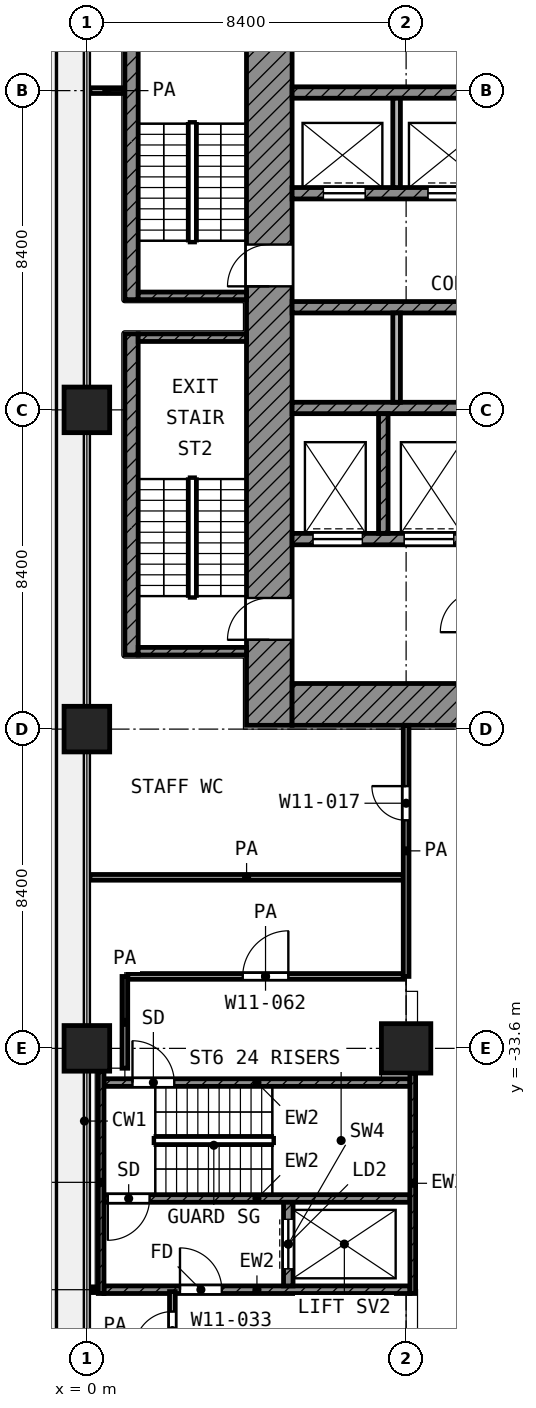
"""IFC4 building model, lengths in metres.
Left out: names, types, materials, properties, quantities, classifications, styles, units other than length and angle.
Written with IfcOpenShell. Run it as: python <this file> out.ifc"""

import sys

from ifc_helpers import new_model, si_unit, direction, frame, frame_2d, origin, origin_2d, place, context, subcontext, project, spatial, rectangle, extrude, element, fill, save


model = new_model("IFC4")
c1 = context("Model", 3, precision=1e-05, world=origin(), true_north=direction((0.0, 1.0)))
c2 = subcontext(c1, "Body", "Model", "MODEL_VIEW")
j1 = project(units=[si_unit("LENGTHUNIT", "METRE"), si_unit("PLANEANGLEUNIT", "RADIAN")], contexts=[c1])
p1 = place(None, origin())
s1 = spatial("IfcSite", under=j1, at=p1, CompositionType="ELEMENT")
p2 = place(p1, origin())
s2 = spatial("IfcBuilding", under=s1, at=p2, CompositionType="ELEMENT")
p3 = place(p2, frame((0.0, 0.0, 51.8)))
s3 = spatial("IfcBuildingStorey", under=s2, at=p3, CompositionType="ELEMENT", Elevation=51.8)
for number, where, z_axis, x_axis in (
    (1, (0.0, -16.8, 0.0), (0.0, 0.0, 1.0), (1.0, 0.0, 0.0)),
    (2, (0.0, -25.2, 0.0), (0.0, 0.0, 1.0), (1.0, 0.0, 0.0)),
    (3, (0.0, -33.6, 0.0), (0.0, 0.0, 1.0), (1.0, 0.0, 0.0)),
):
    element("IfcColumn", number, at=place(p3, frame(where, z_axis=z_axis, x_axis=x_axis)), inside=s3, PredefinedType="COLUMN", context=c2, shape_type="SweptSolid", body=[
        extrude(rectangle(XDim=1.2, YDim=1.2, at=origin_2d()), origin(), (0.0, 0.0, 1.0), 4.2),
    ])
p4 = place(p3, frame((8.4, -33.6, 0.0), z_axis=(0.0, 0.0, 1.0), x_axis=(1.0, 0.0, 0.0)))
e4 = element("IfcColumn", 4, at=p4, inside=s3, PredefinedType="COLUMN", context=c2, shape_type="SweptSolid", body=[
    extrude(rectangle(XDim=1.3, YDim=1.3, at=origin_2d()), origin(), (0.0, 0.0, 1.0), 4.2),
])
p5 = place(p3, frame((4.8, -25.1, 0.0), z_axis=(0.0, 0.0, 1.0), x_axis=(0.0, 1.0, 0.0)))
e5 = element("IfcWall", 5, at=p5, inside=s3, PredefinedType="SHEAR", context=c2, shape_type="SweptSolid", body=[
    extrude(rectangle(XDim=19.7, YDim=1.2, at=frame_2d((9.85, 0.0))), origin(), (0.0, 0.0, 1.0), 3.9),
])
p6 = place(p5, frame((11.55, 0.0, 0.0)))
e6 = element("IfcOpeningElement", 6, at=p6, cuts=e5, PredefinedType="OPENING", context=c2, shape_type="SweptSolid", body=[
    extrude(rectangle(XDim=1.1, YDim=2.1, at=frame_2d((0.55, 1.05))), frame((0.0, 0.61, 0.0), z_axis=(0.0, -1.0, 0.0), x_axis=(1.0, 0.0, 0.0)), (0.0, 0.0, 1.0), 1.22),
])
p7 = place(p5, frame((2.25, 0.0, 0.0)))
e7 = element("IfcOpeningElement", 7, at=p7, cuts=e5, PredefinedType="OPENING", context=c2, shape_type="SweptSolid", body=[
    extrude(rectangle(XDim=1.1, YDim=2.1, at=frame_2d((0.55, 1.05))), frame((0.0, 0.61, 0.0), z_axis=(0.0, -1.0, 0.0), x_axis=(1.0, 0.0, 0.0)), (0.0, 0.0, 1.0), 1.22),
])
p8 = place(p3, frame((5.4, -24.55, 0.0), z_axis=(0.0, 0.0, 1.0), x_axis=(1.0, 0.0, 0.0)))
e8 = element("IfcWall", 8, at=p8, inside=s3, PredefinedType="SHEAR", context=c2, shape_type="SweptSolid", body=[
    extrude(rectangle(XDim=18.6, YDim=1.1, at=frame_2d((9.3, 0.0))), origin(), (0.0, 0.0, 1.0), 3.9),
])
p9 = place(p8, frame((6.3, 0.0, 0.0)))
e9 = element("IfcOpeningElement", 9, at=p9, cuts=e8, PredefinedType="OPENING", context=c2, shape_type="SweptSolid", body=[
    extrude(rectangle(XDim=1.8, YDim=2.1, at=frame_2d((0.9, 1.05))), frame((0.0, 0.56, 0.0), z_axis=(0.0, -1.0, 0.0), x_axis=(1.0, 0.0, 0.0)), (0.0, 0.0, 1.0), 1.12),
])
p10 = place(p3, frame((5.4, -8.45, 0.0), z_axis=(0.0, 0.0, 1.0), x_axis=(1.0, 0.0, 0.0)))
e10 = element("IfcWall", 10, at=p10, inside=s3, PredefinedType="SHEAR", context=c2, shape_type="SweptSolid", body=[
    extrude(rectangle(XDim=16.65, YDim=0.3, at=frame_2d((8.325, 0.0))), origin(), (0.0, 0.0, 1.0), 3.9),
])
p11 = place(p3, frame((5.4, -11.1, 0.0), z_axis=(0.0, 0.0, 1.0), x_axis=(1.0, 0.0, 0.0)))
e11 = element("IfcWall", 11, at=p11, inside=s3, PredefinedType="SHEAR", context=c2, shape_type="SweptSolid", body=[
    extrude(rectangle(XDim=16.65, YDim=0.3, at=frame_2d((8.325, 0.0))), origin(), (0.0, 0.0, 1.0), 3.9),
])
p12 = place(p11, frame((0.825, 0.0, 0.0)))
e12 = element("IfcOpeningElement", 12, at=p12, cuts=e11, PredefinedType="OPENING", context=c2, shape_type="SweptSolid", body=[
    extrude(rectangle(XDim=1.1, YDim=2.1, at=frame_2d((0.55, 1.05))), frame((0.0, 0.16, 0.0), z_axis=(0.0, -1.0, 0.0), x_axis=(1.0, 0.0, 0.0)), (0.0, 0.0, 1.0), 0.32),
])
p13 = place(p11, frame((3.575, 0.0, 0.0)))
e13 = element("IfcOpeningElement", 13, at=p13, cuts=e11, PredefinedType="OPENING", context=c2, shape_type="SweptSolid", body=[
    extrude(rectangle(XDim=1.1, YDim=2.1, at=frame_2d((0.55, 1.05))), frame((0.0, 0.16, 0.0), z_axis=(0.0, -1.0, 0.0), x_axis=(1.0, 0.0, 0.0)), (0.0, 0.0, 1.0), 0.32),
])
p14 = place(p11, frame((6.325, 0.0, 0.0)))
e14 = element("IfcOpeningElement", 14, at=p14, cuts=e11, PredefinedType="OPENING", context=c2, shape_type="SweptSolid", body=[
    extrude(rectangle(XDim=1.1, YDim=2.1, at=frame_2d((0.55, 1.05))), frame((0.0, 0.16, 0.0), z_axis=(0.0, -1.0, 0.0), x_axis=(1.0, 0.0, 0.0)), (0.0, 0.0, 1.0), 0.32),
])
p15 = place(p11, frame((9.075, 0.0, 0.0)))
e15 = element("IfcOpeningElement", 15, at=p15, cuts=e11, PredefinedType="OPENING", context=c2, shape_type="SweptSolid", body=[
    extrude(rectangle(XDim=1.1, YDim=2.1, at=frame_2d((0.55, 1.05))), frame((0.0, 0.16, 0.0), z_axis=(0.0, -1.0, 0.0), x_axis=(1.0, 0.0, 0.0)), (0.0, 0.0, 1.0), 0.32),
])
for number, where, z_axis, x_axis in (
    (16, (5.4, -14.1, 0.0), (0.0, 0.0, 1.0), (1.0, 0.0, 0.0)),
    (17, (5.4, -16.75, 0.0), (0.0, 0.0, 1.0), (1.0, 0.0, 0.0)),
):
    element("IfcWall", number, at=place(p3, frame(where, z_axis=z_axis, x_axis=x_axis)), inside=s3, PredefinedType="SHEAR", context=c2, shape_type="SweptSolid", body=[
        extrude(rectangle(XDim=16.65, YDim=0.3, at=frame_2d((8.325, 0.0))), origin(), (0.0, 0.0, 1.0), 3.9),
    ])
p16 = place(p3, frame((5.4, -20.2, 0.0), z_axis=(0.0, 0.0, 1.0), x_axis=(1.0, 0.0, 0.0)))
e18 = element("IfcWall", 18, at=p16, inside=s3, PredefinedType="SHEAR", context=c2, shape_type="SweptSolid", body=[
    extrude(rectangle(XDim=14.65, YDim=0.3, at=frame_2d((7.325, 0.0))), origin(), (0.0, 0.0, 1.0), 3.9),
])
p17 = place(p16, frame((10.55, 0.0, 0.0)))
e19 = element("IfcOpeningElement", 19, at=p17, cuts=e18, PredefinedType="OPENING", context=c2, shape_type="SweptSolid", body=[
    extrude(rectangle(XDim=1.3, YDim=2.1, at=frame_2d((0.65, 1.05))), frame((0.0, 0.16, 0.0), z_axis=(0.0, -1.0, 0.0), x_axis=(1.0, 0.0, 0.0)), (0.0, 0.0, 1.0), 0.32),
])
p18 = place(p16, frame((12.95, 0.0, 0.0)))
e20 = element("IfcOpeningElement", 20, at=p18, cuts=e18, PredefinedType="OPENING", context=c2, shape_type="SweptSolid", body=[
    extrude(rectangle(XDim=1.3, YDim=2.1, at=frame_2d((0.65, 1.05))), frame((0.0, 0.16, 0.0), z_axis=(0.0, -1.0, 0.0), x_axis=(1.0, 0.0, 0.0)), (0.0, 0.0, 1.0), 0.32),
])
p19 = place(p16, frame((0.55, 0.0, 0.0)))
e21 = element("IfcOpeningElement", 21, at=p19, cuts=e18, PredefinedType="OPENING", context=c2, shape_type="SweptSolid", body=[
    extrude(rectangle(XDim=1.3, YDim=2.1, at=frame_2d((0.65, 1.05))), frame((0.0, 0.16, 0.0), z_axis=(0.0, -1.0, 0.0), x_axis=(1.0, 0.0, 0.0)), (0.0, 0.0, 1.0), 0.32),
])
p20 = place(p16, frame((2.95, 0.0, 0.0)))
e22 = element("IfcOpeningElement", 22, at=p20, cuts=e18, PredefinedType="OPENING", context=c2, shape_type="SweptSolid", body=[
    extrude(rectangle(XDim=1.3, YDim=2.1, at=frame_2d((0.65, 1.05))), frame((0.0, 0.16, 0.0), z_axis=(0.0, -1.0, 0.0), x_axis=(1.0, 0.0, 0.0)), (0.0, 0.0, 1.0), 0.32),
])
p21 = place(p16, frame((6.55, 0.0, 0.0)))
e23 = element("IfcOpeningElement", 23, at=p21, cuts=e18, PredefinedType="OPENING", context=c2, shape_type="SweptSolid", body=[
    extrude(rectangle(XDim=0.9, YDim=2.1, at=frame_2d((0.45, 1.05))), frame((0.0, 0.16, 0.0), z_axis=(0.0, -1.0, 0.0), x_axis=(1.0, 0.0, 0.0)), (0.0, 0.0, 1.0), 0.32),
])
p22 = place(p16, frame((8.95, 0.0, 0.0)))
e24 = element("IfcOpeningElement", 24, at=p22, cuts=e18, PredefinedType="OPENING", context=c2, shape_type="SweptSolid", body=[
    extrude(rectangle(XDim=0.9, YDim=2.1, at=frame_2d((0.45, 1.05))), frame((0.0, 0.16, 0.0), z_axis=(0.0, -1.0, 0.0), x_axis=(1.0, 0.0, 0.0)), (0.0, 0.0, 1.0), 0.32),
])
p23 = place(p3, frame((7.8, -20.05, 0.0), z_axis=(0.0, 0.0, 1.0), x_axis=(0.0, 1.0, 0.0)))
e25 = element("IfcWall", 25, at=p23, inside=s3, PredefinedType="SHEAR", context=c2, shape_type="SweptSolid", body=[
    extrude(rectangle(XDim=3.15, YDim=0.25, at=frame_2d((1.575, 0.0))), origin(), (0.0, 0.0, 1.0), 3.9),
])
p24 = place(p3, frame((8.15, -10.95, 0.0), z_axis=(0.0, 0.0, 1.0), x_axis=(0.0, 1.0, 0.0)))
e26 = element("IfcWall", 26, at=p24, inside=s3, PredefinedType="PARTITIONING", context=c2, shape_type="SweptSolid", body=[
    extrude(rectangle(XDim=2.35, YDim=0.2, at=frame_2d((1.175, 0.0))), origin(), (0.0, 0.0, 1.0), 3.9),
])
p25 = place(p3, frame((8.15, -16.6, 0.0), z_axis=(0.0, 0.0, 1.0), x_axis=(0.0, 1.0, 0.0)))
e27 = element("IfcWall", 27, at=p25, inside=s3, PredefinedType="PARTITIONING", context=c2, shape_type="SweptSolid", body=[
    extrude(rectangle(XDim=2.35, YDim=0.2, at=frame_2d((1.175, 0.0))), origin(), (0.0, 0.0, 1.0), 3.9),
])
p26 = place(p3, frame((1.175, -13.9, 0.0), z_axis=(0.0, 0.0, 1.0), x_axis=(0.0, 1.0, 0.0)))
e28 = element("IfcWall", 28, at=p26, inside=s3, PredefinedType="SHEAR", context=c2, shape_type="SweptSolid", body=[
    extrude(rectangle(XDim=8.45, YDim=0.35, at=frame_2d((4.225, 0.0))), origin(), (0.0, 0.0, 1.0), 3.9),
])
p27 = place(p3, frame((1.35, -13.8, 0.0), z_axis=(0.0, 0.0, 1.0), x_axis=(1.0, 0.0, 0.0)))
e29 = element("IfcWall", 29, at=p27, inside=s3, PredefinedType="SHEAR", context=c2, shape_type="SweptSolid", body=[
    extrude(rectangle(XDim=2.85, YDim=0.2, at=frame_2d((1.425, 0.0))), origin(), (0.0, 0.0, 1.0), 3.9),
])
p28 = place(p3, frame((1.175, -23.25, 0.0), z_axis=(0.0, 0.0, 1.0), x_axis=(0.0, 1.0, 0.0)))
e30 = element("IfcWall", 30, at=p28, inside=s3, PredefinedType="SHEAR", context=c2, shape_type="SweptSolid", body=[
    extrude(rectangle(XDim=8.45, YDim=0.35, at=frame_2d((4.225, 0.0))), origin(), (0.0, 0.0, 1.0), 3.9),
])
for number, where, z_axis, x_axis in (
    (31, (1.35, -14.9, 0.0), (0.0, 0.0, 1.0), (1.0, 0.0, 0.0)),
    (32, (1.35, -23.15, 0.0), (0.0, 0.0, 1.0), (1.0, 0.0, 0.0)),
):
    element("IfcWall", number, at=place(p3, frame(where, z_axis=z_axis, x_axis=x_axis)), inside=s3, PredefinedType="SHEAR", context=c2, shape_type="SweptSolid", body=[
        extrude(rectangle(XDim=2.85, YDim=0.2, at=frame_2d((1.425, 0.0))), origin(), (0.0, 0.0, 1.0), 3.9),
    ])
p29 = place(p3, frame((0.375, -40.05, 0.0), z_axis=(0.0, 0.0, 1.0), x_axis=(0.0, 1.0, 0.0)))
e33 = element("IfcWall", 33, at=p29, inside=s3, PredefinedType="SHEAR", context=c2, shape_type="SweptSolid", body=[
    extrude(rectangle(XDim=5.85, YDim=0.15, at=frame_2d((2.925, 0.0))), origin(), (0.0, 0.0, 1.0), 3.9),
])
p30 = place(p3, frame((8.575, -40.05, 0.0), z_axis=(0.0, 0.0, 1.0), x_axis=(0.0, 1.0, 0.0)))
e34 = element("IfcWall", 34, at=p30, inside=s3, PredefinedType="SHEAR", context=c2, shape_type="SweptSolid", body=[
    extrude(rectangle(XDim=5.8, YDim=0.15, at=frame_2d((2.9, 0.0))), origin(), (0.0, 0.0, 1.0), 3.9),
])
p31 = place(p3, frame((0.45, -34.5, 0.0), z_axis=(0.0, 0.0, 1.0), x_axis=(1.0, 0.0, 0.0)))
e35 = element("IfcWall", 35, at=p31, inside=s3, PredefinedType="SHEAR", context=c2, shape_type="SweptSolid", body=[
    extrude(rectangle(XDim=8.05, YDim=0.2, at=frame_2d((4.025, 0.0))), origin(), (0.0, 0.0, 1.0), 3.9),
])
p32 = place(p31, frame((0.75, 0.0, 0.0)))
e36 = element("IfcOpeningElement", 36, at=p32, cuts=e35, PredefinedType="OPENING", context=c2, shape_type="SweptSolid", body=[
    extrude(rectangle(XDim=1.1, YDim=2.1, at=frame_2d((0.55, 1.05))), frame((0.0, 0.11, 0.0), z_axis=(0.0, -1.0, 0.0), x_axis=(1.0, 0.0, 0.0)), (0.0, 0.0, 1.0), 0.22),
])
p33 = place(p3, frame((0.45, -37.55, 0.0), z_axis=(0.0, 0.0, 1.0), x_axis=(1.0, 0.0, 0.0)))
e37 = element("IfcWall", 37, at=p33, inside=s3, PredefinedType="SHEAR", context=c2, shape_type="SweptSolid", body=[
    extrude(rectangle(XDim=8.05, YDim=0.2, at=frame_2d((4.025, 0.0))), origin(), (0.0, 0.0, 1.0), 3.9),
])
p34 = place(p33, frame((0.1, 0.0, 0.0)))
e38 = element("IfcOpeningElement", 38, at=p34, cuts=e37, PredefinedType="OPENING", context=c2, shape_type="SweptSolid", body=[
    extrude(rectangle(XDim=1.1, YDim=2.1, at=frame_2d((0.55, 1.05))), frame((0.0, 0.11, 0.0), z_axis=(0.0, -1.0, 0.0), x_axis=(1.0, 0.0, 0.0)), (0.0, 0.0, 1.0), 0.22),
])
p35 = place(p3, frame((0.45, -39.95, 0.0), z_axis=(0.0, 0.0, 1.0), x_axis=(1.0, 0.0, 0.0)))
e39 = element("IfcWall", 39, at=p35, inside=s3, PredefinedType="SHEAR", context=c2, shape_type="SweptSolid", body=[
    extrude(rectangle(XDim=8.05, YDim=0.2, at=frame_2d((4.025, 0.0))), origin(), (0.0, 0.0, 1.0), 3.9),
])
p36 = place(p35, frame((2.0, 0.0, 0.0)))
e40 = element("IfcOpeningElement", 40, at=p36, cuts=e39, PredefinedType="OPENING", context=c2, shape_type="SweptSolid", body=[
    extrude(rectangle(XDim=1.1, YDim=2.1, at=frame_2d((0.55, 1.05))), frame((0.0, 0.11, 0.0), z_axis=(0.0, -1.0, 0.0), x_axis=(1.0, 0.0, 0.0)), (0.0, 0.0, 1.0), 0.22),
])
p37 = place(p3, frame((5.3, -39.85, 0.0), z_axis=(0.0, 0.0, 1.0), x_axis=(0.0, 1.0, 0.0)))
e41 = element("IfcWall", 41, at=p37, inside=s3, PredefinedType="SHEAR", context=c2, shape_type="SweptSolid", body=[
    extrude(rectangle(XDim=2.2, YDim=0.25, at=frame_2d((1.1, 0.0))), origin(), (0.0, 0.0, 1.0), 3.9),
])
p38 = place(p37, frame((0.45, 0.0, 0.0)))
e42 = element("IfcOpeningElement", 42, at=p38, cuts=e41, PredefinedType="OPENING", context=c2, shape_type="SweptSolid", body=[
    extrude(rectangle(XDim=1.3, YDim=2.1, at=frame_2d((0.65, 1.05))), frame((0.0, 0.135, 0.0), z_axis=(0.0, -1.0, 0.0), x_axis=(1.0, 0.0, 0.0)), (0.0, 0.0, 1.0), 0.27),
])
p39 = place(p3, frame((0.08, -39.95, 0.0), z_axis=(0.0, 0.0, 1.0), x_axis=(1.0, 0.0, 0.0)))
e43 = element("IfcWall", 43, at=p39, inside=s3, PredefinedType="PARTITIONING", context=c2, shape_type="SweptSolid", body=[
    extrude(rectangle(XDim=0.19, YDim=0.15, at=frame_2d((0.095, 0.0))), origin(), (0.0, 0.0, 1.0), 3.9),
])
p40 = place(p3, frame((1.077, -31.707, 0.0), z_axis=(0.0, 0.0, 1.0), x_axis=(1.0, 0.0, 0.0)))
e44 = element("IfcWall", 44, at=p40, inside=s3, PredefinedType="PARTITIONING", context=c2, shape_type="SweptSolid", body=[
    extrude(rectangle(XDim=7.248, YDim=0.15, at=frame_2d((3.624, 0.0))), origin(), (0.0, 0.0, 1.0), 3.9),
])
p41 = place(p40, frame((3.024, 0.0, 0.0)))
e45 = element("IfcOpeningElement", 45, at=p41, cuts=e44, PredefinedType="OPENING", context=c2, shape_type="SweptSolid", body=[
    extrude(rectangle(XDim=1.2, YDim=2.1, at=frame_2d((0.6, 1.05))), frame((0.0, 0.085, 0.0), z_axis=(0.0, -1.0, 0.0), x_axis=(1.0, 0.0, 0.0)), (0.0, 0.0, 1.0), 0.17),
])
p42 = place(p3, frame((0.08, -29.1, 0.0), z_axis=(0.0, 0.0, 1.0), x_axis=(1.0, 0.0, 0.0)))
e46 = element("IfcWall", 46, at=p42, inside=s3, PredefinedType="PARTITIONING", context=c2, shape_type="SweptSolid", body=[
    extrude(rectangle(XDim=8.245, YDim=0.15, at=frame_2d((4.123, 0.0))), origin(), (0.0, 0.0, 1.0), 3.9),
])
p43 = place(p3, frame((0.08, -8.4, 0.0), z_axis=(0.0, 0.0, 1.0), x_axis=(1.0, 0.0, 0.0)))
e47 = element("IfcWall", 47, at=p43, inside=s3, PredefinedType="PARTITIONING", context=c2, shape_type="SweptSolid", body=[
    extrude(rectangle(XDim=0.89, YDim=0.15, at=frame_2d((0.445, 0.0))), origin(), (0.0, 0.0, 1.0), 3.9),
])
p44 = place(p3, frame((1.0, -34.123, 0.0), z_axis=(0.0, 0.0, 1.0), x_axis=(0.0, 1.0, 0.0)))
e48 = element("IfcWall", 48, at=p44, inside=s3, PredefinedType="PARTITIONING", context=c2, shape_type="SweptSolid", body=[
    extrude(rectangle(XDim=2.415, YDim=0.15, at=frame_2d((1.208, 0.0))), origin(), (0.0, 0.0, 1.0), 3.9),
])
p45 = place(p3, frame((2.25, -42.348, 0.0), z_axis=(0.0, 0.0, 1.0), x_axis=(0.0, 1.0, 0.0)))
e49 = element("IfcWall", 49, at=p45, inside=s3, PredefinedType="PARTITIONING", context=c2, shape_type="SweptSolid", body=[
    extrude(rectangle(XDim=2.348, YDim=0.15, at=frame_2d((1.174, 0.0))), origin(), (0.0, 0.0, 1.0), 3.9),
])
p46 = place(p45, frame((0.823, 0.0, 0.0)))
e50 = element("IfcOpeningElement", 50, at=p46, cuts=e49, PredefinedType="OPENING", context=c2, shape_type="SweptSolid", body=[
    extrude(rectangle(XDim=1.0, YDim=2.1, at=frame_2d((0.5, 1.05))), frame((0.0, 0.085, 0.0), z_axis=(0.0, -1.0, 0.0), x_axis=(1.0, 0.0, 0.0)), (0.0, 0.0, 1.0), 0.17),
])
p47 = place(p3, frame((8.4, -31.707, 0.0), z_axis=(0.0, 0.0, 1.0), x_axis=(0.0, 1.0, 0.0)))
e51 = element("IfcWall", 51, at=p47, inside=s3, PredefinedType="PARTITIONING", context=c2, shape_type="SweptSolid", body=[
    extrude(rectangle(XDim=6.607, YDim=0.15, at=frame_2d((3.303, 0.0))), origin(), (0.0, 0.0, 1.0), 3.9),
])
p48 = place(p47, frame((4.107, 0.0, 0.0)))
e52 = element("IfcOpeningElement", 52, at=p48, cuts=e51, PredefinedType="OPENING", context=c2, shape_type="SweptSolid", body=[
    extrude(rectangle(XDim=0.9, YDim=2.1, at=frame_2d((0.45, 1.05))), frame((0.0, 0.085, 0.0), z_axis=(0.0, -1.0, 0.0), x_axis=(1.0, 0.0, 0.0)), (0.0, 0.0, 1.0), 0.17),
])
p49 = place(p12, origin())
e53 = element("IfcDoor", 53, at=p49, inside=s3, OperationType="DOUBLE_DOOR_SLIDING", PredefinedType="DOOR", context=c2, shape_type="SweptSolid", body=[
    extrude(rectangle(XDim=1.1, YDim=2.1, at=frame_2d((0.55, 1.05))), frame((0.0, 0.025, 0.0), z_axis=(0.0, -1.0, 0.0), x_axis=(1.0, 0.0, 0.0)), (0.0, 0.0, 1.0), 0.05),
])
fill(e12, e53)
p50 = place(p13, origin())
e54 = element("IfcDoor", 54, at=p50, inside=s3, OperationType="DOUBLE_DOOR_SLIDING", PredefinedType="DOOR", context=c2, shape_type="SweptSolid", body=[
    extrude(rectangle(XDim=1.1, YDim=2.1, at=frame_2d((0.55, 1.05))), frame((0.0, 0.025, 0.0), z_axis=(0.0, -1.0, 0.0), x_axis=(1.0, 0.0, 0.0)), (0.0, 0.0, 1.0), 0.05),
])
fill(e13, e54)
p51 = place(p19, origin())
e55 = element("IfcDoor", 55, at=p51, inside=s3, OperationType="DOUBLE_DOOR_SLIDING", PredefinedType="DOOR", context=c2, shape_type="SweptSolid", body=[
    extrude(rectangle(XDim=1.3, YDim=2.1, at=frame_2d((0.65, 1.05))), frame((0.0, 0.025, 0.0), z_axis=(0.0, -1.0, 0.0), x_axis=(1.0, 0.0, 0.0)), (0.0, 0.0, 1.0), 0.05),
])
fill(e21, e55)
p52 = place(p20, origin())
e56 = element("IfcDoor", 56, at=p52, inside=s3, OperationType="DOUBLE_DOOR_SLIDING", PredefinedType="DOOR", context=c2, shape_type="SweptSolid", body=[
    extrude(rectangle(XDim=1.3, YDim=2.1, at=frame_2d((0.65, 1.05))), frame((0.0, 0.025, 0.0), z_axis=(0.0, -1.0, 0.0), x_axis=(1.0, 0.0, 0.0)), (0.0, 0.0, 1.0), 0.05),
])
fill(e22, e56)
p53 = place(p6, origin())
e57 = element("IfcDoor", 57, at=p53, inside=s3, OperationType="SINGLE_SWING_LEFT", PredefinedType="DOOR", context=c2, shape_type="SweptSolid", body=[
    extrude(rectangle(XDim=1.1, YDim=2.1, at=frame_2d((0.55, 1.05))), frame((0.0, 0.025, 0.0), z_axis=(0.0, -1.0, 0.0), x_axis=(1.0, 0.0, 0.0)), (0.0, 0.0, 1.0), 0.05),
])
fill(e6, e57)
p54 = place(p7, origin())
e58 = element("IfcDoor", 58, at=p54, inside=s3, OperationType="SINGLE_SWING_LEFT", PredefinedType="DOOR", context=c2, shape_type="SweptSolid", body=[
    extrude(rectangle(XDim=1.1, YDim=2.1, at=frame_2d((0.55, 1.05))), frame((0.0, 0.025, 0.0), z_axis=(0.0, -1.0, 0.0), x_axis=(1.0, 0.0, 0.0)), (0.0, 0.0, 1.0), 0.05),
])
fill(e7, e58)
p55 = place(p32, origin())
e59 = element("IfcDoor", 59, at=p55, inside=s3, OperationType="SINGLE_SWING_LEFT", PredefinedType="DOOR", context=c2, shape_type="SweptSolid", body=[
    extrude(rectangle(XDim=1.1, YDim=2.1, at=frame_2d((0.55, 1.05))), frame((0.0, 0.025, 0.0), z_axis=(0.0, -1.0, 0.0), x_axis=(1.0, 0.0, 0.0)), (0.0, 0.0, 1.0), 0.05),
])
fill(e36, e59)
p56 = place(p34, frame((1.1, 0.0, 0.0), z_axis=(0.0, 0.0, 1.0), x_axis=(-1.0, 0.0, 0.0)))
e60 = element("IfcDoor", 60, at=p56, inside=s3, OperationType="SINGLE_SWING_LEFT", PredefinedType="DOOR", context=c2, shape_type="SweptSolid", body=[
    extrude(rectangle(XDim=1.1, YDim=2.1, at=frame_2d((0.55, 1.05))), frame((0.0, 0.025, 0.0), z_axis=(0.0, -1.0, 0.0), x_axis=(1.0, 0.0, 0.0)), (0.0, 0.0, 1.0), 0.05),
])
fill(e38, e60)
p57 = place(p38, origin())
e61 = element("IfcDoor", 61, at=p57, inside=s3, OperationType="DOUBLE_DOOR_SLIDING", PredefinedType="DOOR", context=c2, shape_type="SweptSolid", body=[
    extrude(rectangle(XDim=1.3, YDim=2.1, at=frame_2d((0.65, 1.05))), frame((0.0, 0.025, 0.0), z_axis=(0.0, -1.0, 0.0), x_axis=(1.0, 0.0, 0.0)), (0.0, 0.0, 1.0), 0.05),
])
fill(e42, e61)
p58 = place(p36, origin())
e62 = element("IfcDoor", 62, at=p58, inside=s3, OperationType="SINGLE_SWING_LEFT", PredefinedType="DOOR", context=c2, shape_type="SweptSolid", body=[
    extrude(rectangle(XDim=1.1, YDim=2.1, at=frame_2d((0.55, 1.05))), frame((0.0, 0.025, 0.0), z_axis=(0.0, -1.0, 0.0), x_axis=(1.0, 0.0, 0.0)), (0.0, 0.0, 1.0), 0.05),
])
fill(e40, e62)
p59 = place(p48, origin())
e63 = element("IfcDoor", 63, at=p59, inside=s3, OperationType="SINGLE_SWING_RIGHT", PredefinedType="DOOR", context=c2, shape_type="SweptSolid", body=[
    extrude(rectangle(XDim=0.9, YDim=2.1, at=frame_2d((0.45, 1.05))), frame((0.0, 0.025, 0.0), z_axis=(0.0, -1.0, 0.0), x_axis=(1.0, 0.0, 0.0)), (0.0, 0.0, 1.0), 0.05),
])
fill(e52, e63)
p60 = place(p41, origin())
e64 = element("IfcDoor", 64, at=p60, inside=s3, OperationType="SINGLE_SWING_RIGHT", PredefinedType="DOOR", context=c2, shape_type="SweptSolid", body=[
    extrude(rectangle(XDim=1.2, YDim=2.1, at=frame_2d((0.6, 1.05))), frame((0.0, 0.025, 0.0), z_axis=(0.0, -1.0, 0.0), x_axis=(1.0, 0.0, 0.0)), (0.0, 0.0, 1.0), 0.05),
])
fill(e45, e64)
p61 = place(p46, origin())
e65 = element("IfcDoor", 65, at=p61, inside=s3, OperationType="SINGLE_SWING_LEFT", PredefinedType="DOOR", context=c2, shape_type="SweptSolid", body=[
    extrude(rectangle(XDim=1.0, YDim=2.1, at=frame_2d((0.5, 1.05))), frame((0.0, 0.025, 0.0), z_axis=(0.0, -1.0, 0.0), x_axis=(1.0, 0.0, 0.0)), (0.0, 0.0, 1.0), 0.05),
])
fill(e50, e65)
save(model, sys.argv[1])
